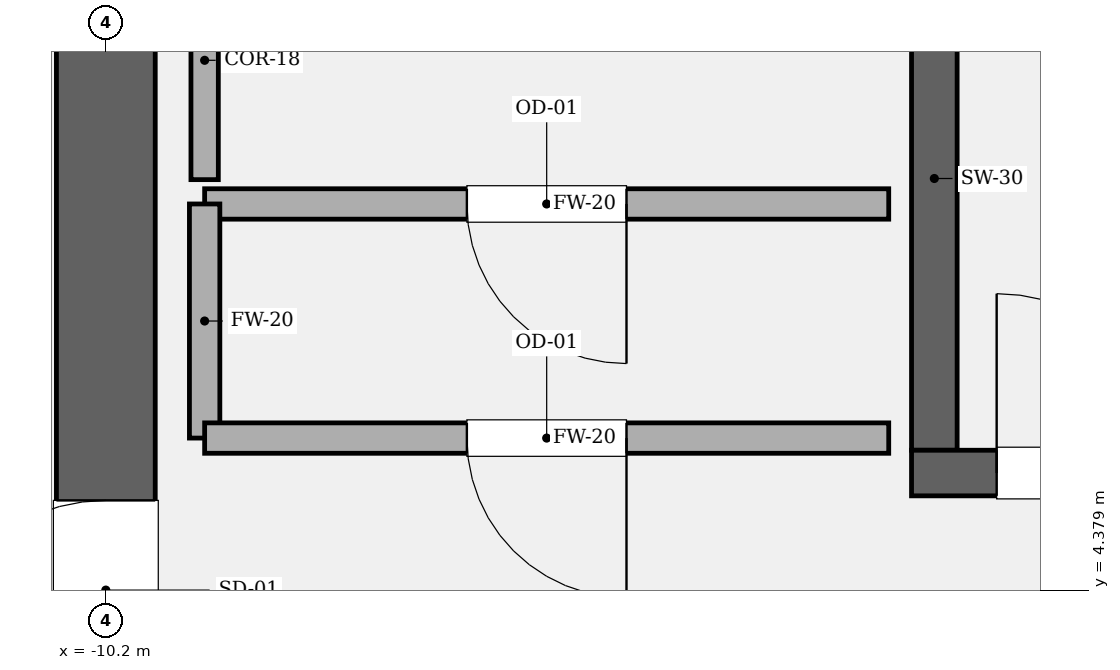
"""IFC4 building model, lengths in metres.
Left out: names, types, materials, properties, quantities, classifications, styles, units other than length and angle.
Written with IfcOpenShell. Run it as: python <this file> out.ifc"""

import sys

from ifc_helpers import new_model, si_unit, direction, frame, frame_2d, origin, place, context, subcontext, project, spatial, rectangle, extrude, element, fill, save


model = new_model("IFC4")
c1 = context("Model", 3, precision=1e-05, world=origin(), true_north=direction((0.0, 1.0)))
c2 = subcontext(c1, "Body", "Model", "MODEL_VIEW")
j1 = project(units=[si_unit("LENGTHUNIT", "METRE"), si_unit("PLANEANGLEUNIT", "RADIAN")], contexts=[c1])
p1 = place(None, origin())
s1 = spatial("IfcSite", under=j1, at=p1, CompositionType="ELEMENT")
p2 = place(p1, origin())
s2 = spatial("IfcBuilding", under=s1, at=p2, CompositionType="ELEMENT")
p3 = place(p2, frame((0.0, 0.0, 224.85)))
s3 = spatial("IfcBuildingStorey", under=s2, at=p3, CompositionType="ELEMENT", Elevation=224.85)
p4 = place(p3, frame((-10.2, -8.875, 0.0), z_axis=(0.0, 0.0, 1.0), x_axis=(0.0, 1.0, 0.0)))
e1 = element("IfcWall", 1, at=p4, inside=s3, PredefinedType="SHEAR", context=c2, shape_type="SweptSolid", body=[
    extrude(rectangle(XDim=17.75, YDim=0.65, at=frame_2d((8.875, 0.0))), origin(), (0.0, 0.0, 1.0), 4.05),
])
p5 = place(p4, frame((12.665, 0.0, 0.0)))
e2 = element("IfcOpeningElement", 2, at=p5, cuts=e1, PredefinedType="OPENING", context=c2, shape_type="SweptSolid", body=[
    extrude(rectangle(XDim=1.18, YDim=2.2, at=frame_2d((0.59, 1.1))), frame((0.0, 0.335, 0.0), z_axis=(0.0, -1.0, 0.0), x_axis=(1.0, 0.0, 0.0)), (0.0, 0.0, 1.0), 0.67),
])
p6 = place(p3, frame((-4.75, 5.3, 0.0), z_axis=(0.0, 0.0, 1.0), x_axis=(0.0, 1.0, 0.0)))
e3 = element("IfcWall", 3, at=p6, inside=s3, PredefinedType="SOLIDWALL", context=c2, shape_type="SweptSolid", body=[
    extrude(rectangle(XDim=3.575, YDim=0.3, at=frame_2d((1.788, 0.0))), origin(), (0.0, 0.0, 1.0), 4.05),
])
p7 = place(p3, frame((-4.9, 5.15, 0.0), z_axis=(0.0, 0.0, 1.0), x_axis=(1.0, 0.0, 0.0)))
e4 = element("IfcWall", 4, at=p7, inside=s3, PredefinedType="SOLIDWALL", context=c2, shape_type="SweptSolid", body=[
    extrude(rectangle(XDim=9.8, YDim=0.3, at=frame_2d((4.9, 0.0))), origin(), (0.0, 0.0, 1.0), 4.05),
])
p8 = place(p7, frame((0.56, 0.0, 0.0)))
e5 = element("IfcOpeningElement", 5, at=p8, cuts=e4, PredefinedType="OPENING", context=c2, shape_type="SweptSolid", body=[
    extrude(rectangle(XDim=1.18, YDim=2.2, at=frame_2d((0.59, 1.1))), frame((0.0, 0.16, 0.0), z_axis=(0.0, -1.0, 0.0), x_axis=(1.0, 0.0, 0.0)), (0.0, 0.0, 1.0), 0.32),
])
p9 = place(p3, frame((-5.05, 6.92, 0.0), z_axis=(0.0, 0.0, 1.0), x_axis=(-1.0, 0.0, 0.0)))
e6 = element("IfcWall", 6, at=p9, inside=s3, PredefinedType="SOLIDWALL", context=c2, shape_type="SweptSolid", body=[
    extrude(rectangle(XDim=4.5, YDim=0.2, at=frame_2d((2.25, 0.0))), origin(), (0.0, 0.0, 1.0), 3.83),
])
p10 = place(p9, frame((1.725, 0.0, 0.0)))
e7 = element("IfcOpeningElement", 7, at=p10, cuts=e6, PredefinedType="OPENING", context=c2, shape_type="SweptSolid", body=[
    extrude(rectangle(XDim=1.05, YDim=2.2, at=frame_2d((0.525, 1.1))), frame((0.0, 0.11, 0.0), z_axis=(0.0, -1.0, 0.0), x_axis=(1.0, 0.0, 0.0)), (0.0, 0.0, 1.0), 0.22),
])
p11 = place(p3, frame((-9.55, 6.92, 0.0), z_axis=(0.0, 0.0, 1.0), x_axis=(0.0, -1.0, 0.0)))
e8 = element("IfcWall", 8, at=p11, inside=s3, PredefinedType="SOLIDWALL", context=c2, shape_type="SweptSolid", body=[
    extrude(rectangle(XDim=1.54, YDim=0.2, at=frame_2d((0.77, 0.0))), origin(), (0.0, 0.0, 1.0), 3.83),
])
p12 = place(p3, frame((-9.55, 5.38, 0.0), z_axis=(0.0, 0.0, 1.0), x_axis=(1.0, 0.0, 0.0)))
e9 = element("IfcWall", 9, at=p12, inside=s3, PredefinedType="SOLIDWALL", context=c2, shape_type="SweptSolid", body=[
    extrude(rectangle(XDim=4.5, YDim=0.2, at=frame_2d((2.25, 0.0))), origin(), (0.0, 0.0, 1.0), 3.83),
])
p13 = place(p12, frame((1.725, 0.0, 0.0)))
e10 = element("IfcOpeningElement", 10, at=p13, cuts=e9, PredefinedType="OPENING", context=c2, shape_type="SweptSolid", body=[
    extrude(rectangle(XDim=1.05, YDim=2.2, at=frame_2d((0.525, 1.1))), frame((0.0, 0.11, 0.0), z_axis=(0.0, -1.0, 0.0), x_axis=(1.0, 0.0, 0.0)), (0.0, 0.0, 1.0), 0.22),
])
p14 = place(p3, frame((-9.55, 8.65, 0.0), z_axis=(0.0, 0.0, 1.0), x_axis=(0.0, -1.0, 0.0)))
e11 = element("IfcWall", 11, at=p14, inside=s3, PredefinedType="PARTITIONING", context=c2, shape_type="SweptSolid", body=[
    extrude(rectangle(XDim=1.57, YDim=0.18, at=frame_2d((0.785, 0.0))), origin(), (0.0, 0.0, 1.0), 3.83),
])
p15 = place(p8, origin())
e12 = element("IfcDoor", 12, at=p15, inside=s3, OperationType="SINGLE_SWING_LEFT", PredefinedType="DOOR", context=c2, shape_type="SweptSolid", body=[
    extrude(rectangle(XDim=1.18, YDim=2.2, at=frame_2d((0.59, 1.1))), frame((0.0, 0.025, 0.0), z_axis=(0.0, -1.0, 0.0), x_axis=(1.0, 0.0, 0.0)), (0.0, 0.0, 1.0), 0.05),
])
fill(e5, e12)
p16 = place(p5, origin())
e13 = element("IfcDoor", 13, at=p16, inside=s3, OperationType="SINGLE_SWING_LEFT", PredefinedType="DOOR", context=c2, shape_type="SweptSolid", body=[
    extrude(rectangle(XDim=1.18, YDim=2.2, at=frame_2d((0.59, 1.1))), frame((0.0, 0.025, 0.0), z_axis=(0.0, -1.0, 0.0), x_axis=(1.0, 0.0, 0.0)), (0.0, 0.0, 1.0), 0.05),
])
fill(e2, e13)
p17 = place(p13, origin())
e14 = element("IfcDoor", 14, at=p17, inside=s3, OperationType="SINGLE_SWING_RIGHT", PredefinedType="DOOR", context=c2, shape_type="SweptSolid", body=[
    extrude(rectangle(XDim=1.05, YDim=2.2, at=frame_2d((0.525, 1.1))), frame((0.0, 0.025, 0.0), z_axis=(0.0, -1.0, 0.0), x_axis=(1.0, 0.0, 0.0)), (0.0, 0.0, 1.0), 0.05),
])
fill(e10, e14)
p18 = place(p10, origin())
e15 = element("IfcDoor", 15, at=p18, inside=s3, OperationType="SINGLE_SWING_LEFT", PredefinedType="DOOR", context=c2, shape_type="SweptSolid", body=[
    extrude(rectangle(XDim=1.05, YDim=2.2, at=frame_2d((0.525, 1.1))), frame((0.0, 0.025, 0.0), z_axis=(0.0, -1.0, 0.0), x_axis=(1.0, 0.0, 0.0)), (0.0, 0.0, 1.0), 0.05),
])
fill(e7, e15)
save(model, sys.argv[1])
